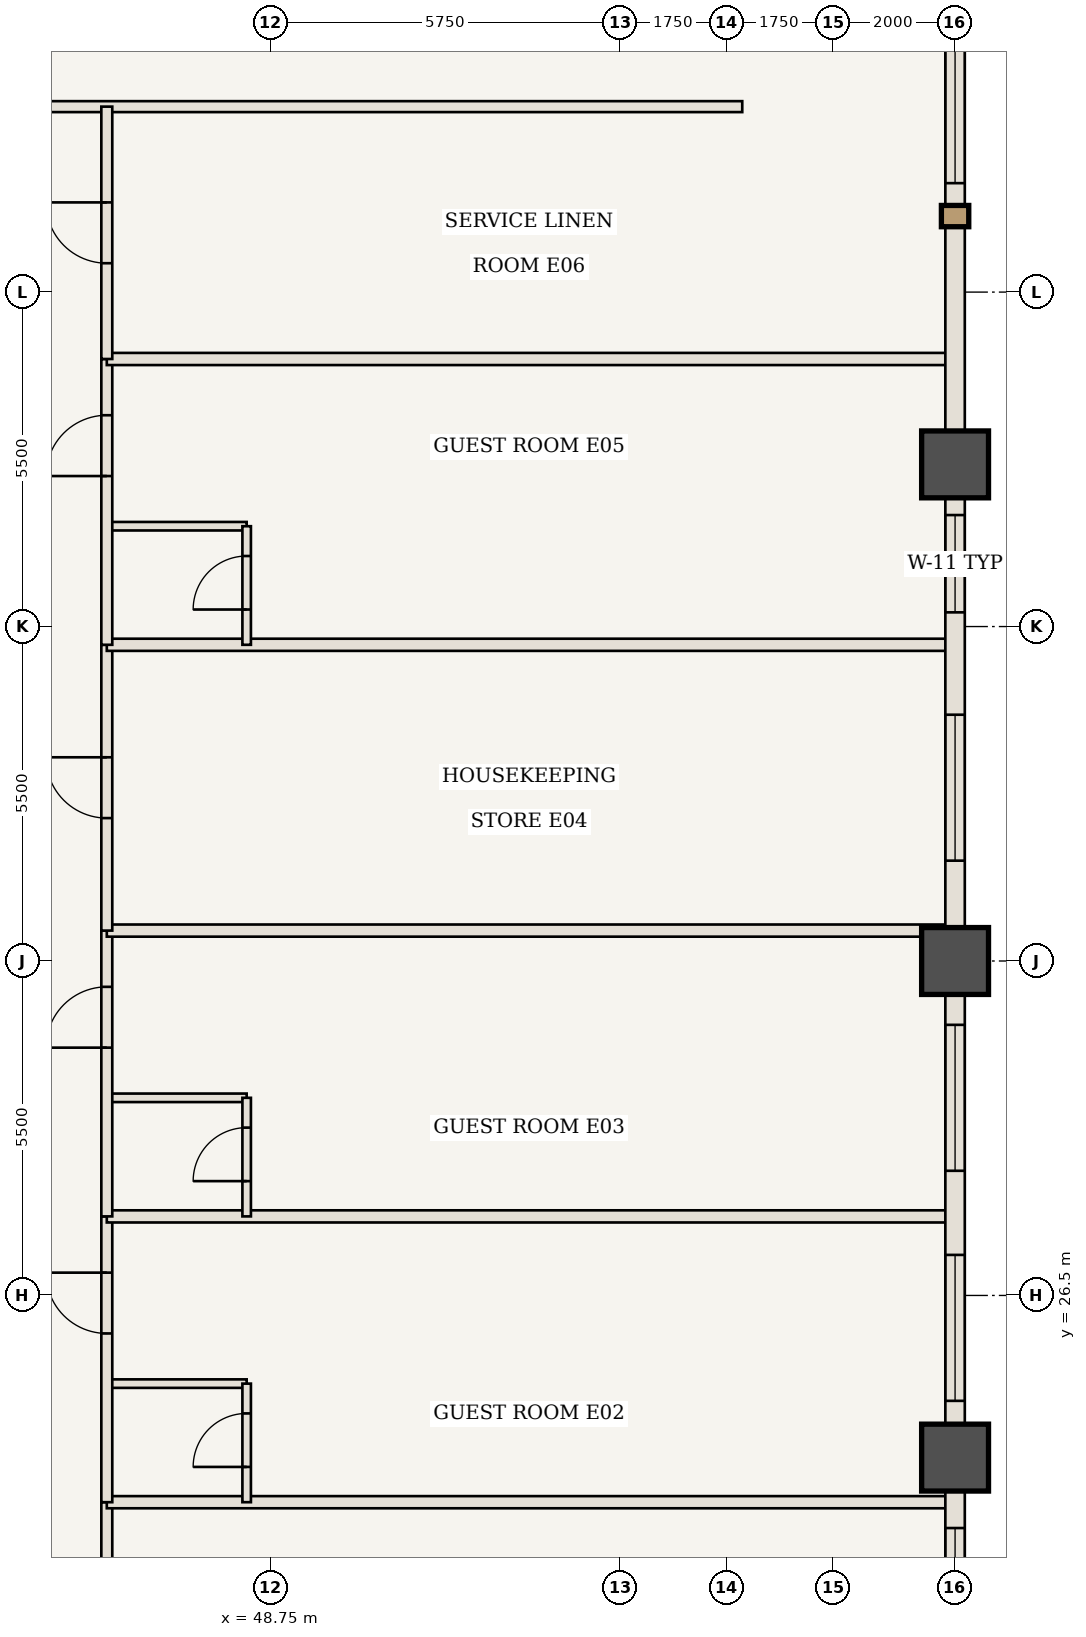
"""IFC4 building model, lengths in metres.
Left out: names, types, materials, properties, quantities, classifications, styles, units other than length and angle.
Written with IfcOpenShell. Run it as: python <this file> out.ifc"""

import sys

from ifc_helpers import new_model, si_unit, direction, frame, frame_2d, origin, origin_2d, place, context, subcontext, project, spatial, rectangle, extrude, element, fill, save


model = new_model("IFC4")
c1 = context("Model", 3, precision=1e-05, world=origin(), true_north=direction((0.0, 1.0)))
c2 = subcontext(c1, "Body", "Model", "MODEL_VIEW")
j1 = project(units=[si_unit("LENGTHUNIT", "METRE"), si_unit("PLANEANGLEUNIT", "RADIAN")], contexts=[c1])
p1 = place(None, origin())
s1 = spatial("IfcSite", under=j1, at=p1, CompositionType="ELEMENT")
p2 = place(p1, origin())
s2 = spatial("IfcBuilding", under=s1, at=p2, CompositionType="ELEMENT")
p3 = place(p2, frame((0.0, 0.0, 66.85)))
s3 = spatial("IfcBuildingStorey", under=s2, at=p3, CompositionType="ELEMENT", Elevation=66.85)
for number, where, z_axis, x_axis in (
    (1, (60.0, 23.833, 0.0), (0.0, 0.0, 1.0), (1.0, 0.0, 0.0)),
    (2, (60.0, 32.0, 0.0), (0.0, 0.0, 1.0), (1.0, 0.0, 0.0)),
    (3, (60.0, 40.167, 0.0), (0.0, 0.0, 1.0), (1.0, 0.0, 0.0)),
):
    element("IfcColumn", number, at=place(p3, frame(where, z_axis=z_axis, x_axis=x_axis)), inside=s3, PredefinedType="COLUMN", context=c2, shape_type="SweptSolid", body=[
        extrude(rectangle(XDim=1.1, YDim=1.1, at=origin_2d()), origin(), (0.0, 0.0, 1.0), 3.5),
    ])
p4 = place(p3, frame((33.8, 46.05, 0.0), z_axis=(0.0, 0.0, 1.0), x_axis=(1.0, 0.0, 0.0)))
e4 = element("IfcWall", 4, at=p4, inside=s3, PredefinedType="STANDARD", context=c2, shape_type="SweptSolid", body=[
    extrude(rectangle(XDim=22.7, YDim=0.18, at=frame_2d((11.35, 0.0))), origin(), (0.0, 0.0, 1.0), 3.32),
])
p5 = place(p4, frame((5.6, 0.0, 0.0)))
e5 = element("IfcOpeningElement", 5, at=p5, cuts=e4, PredefinedType="OPENING", context=c2, shape_type="SweptSolid", body=[
    extrude(rectangle(XDim=1.0, YDim=2.15, at=frame_2d((0.5, 1.075))), frame((0.0, 0.1, 0.0), z_axis=(0.0, -1.0, 0.0), x_axis=(1.0, 0.0, 0.0)), (0.0, 0.0, 1.0), 0.2),
])
p6 = place(p3, frame((46.05, 17.95, 0.0), z_axis=(0.0, 0.0, 1.0), x_axis=(0.0, 1.0, 0.0)))
e6 = element("IfcWall", 6, at=p6, inside=s3, PredefinedType="STANDARD", context=c2, shape_type="SweptSolid", body=[
    extrude(rectangle(XDim=5.15, YDim=0.18, at=frame_2d((2.575, 0.0))), origin(), (0.0, 0.0, 1.0), 3.32),
])
p7 = place(p6, frame((3.0, 0.0, 0.0)))
e7 = element("IfcOpeningElement", 7, at=p7, cuts=e6, PredefinedType="OPENING", context=c2, shape_type="SweptSolid", body=[
    extrude(rectangle(XDim=1.0, YDim=2.15, at=frame_2d((0.5, 1.075))), frame((0.0, 0.1, 0.0), z_axis=(0.0, -1.0, 0.0), x_axis=(1.0, 0.0, 0.0)), (0.0, 0.0, 1.0), 0.2),
])
p8 = place(p3, frame((46.05, 23.1, 0.0), z_axis=(0.0, 0.0, 1.0), x_axis=(1.0, 0.0, 0.0)))
e8 = element("IfcWall", 8, at=p8, inside=s3, PredefinedType="STANDARD", context=c2, shape_type="SweptSolid", body=[
    extrude(rectangle(XDim=13.89, YDim=0.2, at=frame_2d((6.945, 0.0))), origin(), (0.0, 0.0, 1.0), 3.32),
])
p9 = place(p3, frame((46.05, 25.05, 0.0), z_axis=(0.0, 0.0, 1.0), x_axis=(1.0, 0.0, 0.0)))
e9 = element("IfcWall", 9, at=p9, inside=s3, PredefinedType="STANDARD", context=c2, shape_type="SweptSolid", body=[
    extrude(rectangle(XDim=2.3, YDim=0.14, at=frame_2d((1.15, 0.0))), origin(), (0.0, 0.0, 1.0), 3.32),
])
p10 = place(p3, frame((48.35, 23.1, 0.0), z_axis=(0.0, 0.0, 1.0), x_axis=(0.0, 1.0, 0.0)))
e10 = element("IfcWall", 10, at=p10, inside=s3, PredefinedType="STANDARD", context=c2, shape_type="SweptSolid", body=[
    extrude(rectangle(XDim=1.95, YDim=0.14, at=frame_2d((0.975, 0.0))), origin(), (0.0, 0.0, 1.0), 3.32),
])
p11 = place(p10, frame((0.58, 0.0, 0.0)))
e11 = element("IfcOpeningElement", 11, at=p11, cuts=e10, PredefinedType="OPENING", context=c2, shape_type="SweptSolid", body=[
    extrude(rectangle(XDim=0.88, YDim=2.1, at=frame_2d((0.44, 1.05))), frame((0.0, 0.08, 0.0), z_axis=(0.0, -1.0, 0.0), x_axis=(1.0, 0.0, 0.0)), (0.0, 0.0, 1.0), 0.16),
])
p12 = place(p3, frame((46.05, 23.1, 0.0), z_axis=(0.0, 0.0, 1.0), x_axis=(0.0, 1.0, 0.0)))
e12 = element("IfcWall", 12, at=p12, inside=s3, PredefinedType="STANDARD", context=c2, shape_type="SweptSolid", body=[
    extrude(rectangle(XDim=4.7, YDim=0.18, at=frame_2d((2.35, 0.0))), origin(), (0.0, 0.0, 1.0), 3.32),
])
p13 = place(p12, frame((2.775, 0.0, 0.0)))
e13 = element("IfcOpeningElement", 13, at=p13, cuts=e12, PredefinedType="OPENING", context=c2, shape_type="SweptSolid", body=[
    extrude(rectangle(XDim=1.0, YDim=2.15, at=frame_2d((0.5, 1.075))), frame((0.0, 0.1, 0.0), z_axis=(0.0, -1.0, 0.0), x_axis=(1.0, 0.0, 0.0)), (0.0, 0.0, 1.0), 0.2),
])
p14 = place(p3, frame((46.05, 27.8, 0.0), z_axis=(0.0, 0.0, 1.0), x_axis=(1.0, 0.0, 0.0)))
e14 = element("IfcWall", 14, at=p14, inside=s3, PredefinedType="STANDARD", context=c2, shape_type="SweptSolid", body=[
    extrude(rectangle(XDim=13.89, YDim=0.2, at=frame_2d((6.945, 0.0))), origin(), (0.0, 0.0, 1.0), 3.32),
])
p15 = place(p3, frame((46.05, 29.75, 0.0), z_axis=(0.0, 0.0, 1.0), x_axis=(1.0, 0.0, 0.0)))
e15 = element("IfcWall", 15, at=p15, inside=s3, PredefinedType="STANDARD", context=c2, shape_type="SweptSolid", body=[
    extrude(rectangle(XDim=2.3, YDim=0.14, at=frame_2d((1.15, 0.0))), origin(), (0.0, 0.0, 1.0), 3.32),
])
p16 = place(p3, frame((48.35, 27.8, 0.0), z_axis=(0.0, 0.0, 1.0), x_axis=(0.0, 1.0, 0.0)))
e16 = element("IfcWall", 16, at=p16, inside=s3, PredefinedType="STANDARD", context=c2, shape_type="SweptSolid", body=[
    extrude(rectangle(XDim=1.95, YDim=0.14, at=frame_2d((0.975, 0.0))), origin(), (0.0, 0.0, 1.0), 3.32),
])
p17 = place(p16, frame((0.58, 0.0, 0.0)))
e17 = element("IfcOpeningElement", 17, at=p17, cuts=e16, PredefinedType="OPENING", context=c2, shape_type="SweptSolid", body=[
    extrude(rectangle(XDim=0.88, YDim=2.1, at=frame_2d((0.44, 1.05))), frame((0.0, 0.08, 0.0), z_axis=(0.0, -1.0, 0.0), x_axis=(1.0, 0.0, 0.0)), (0.0, 0.0, 1.0), 0.16),
])
p18 = place(p3, frame((46.05, 27.8, 0.0), z_axis=(0.0, 0.0, 1.0), x_axis=(0.0, 1.0, 0.0)))
e18 = element("IfcWall", 18, at=p18, inside=s3, PredefinedType="STANDARD", context=c2, shape_type="SweptSolid", body=[
    extrude(rectangle(XDim=4.7, YDim=0.18, at=frame_2d((2.35, 0.0))), origin(), (0.0, 0.0, 1.0), 3.32),
])
p19 = place(p18, frame((2.775, 0.0, 0.0)))
e19 = element("IfcOpeningElement", 19, at=p19, cuts=e18, PredefinedType="OPENING", context=c2, shape_type="SweptSolid", body=[
    extrude(rectangle(XDim=1.0, YDim=2.15, at=frame_2d((0.5, 1.075))), frame((0.0, 0.1, 0.0), z_axis=(0.0, -1.0, 0.0), x_axis=(1.0, 0.0, 0.0)), (0.0, 0.0, 1.0), 0.2),
])
p20 = place(p3, frame((46.05, 32.5, 0.0), z_axis=(0.0, 0.0, 1.0), x_axis=(1.0, 0.0, 0.0)))
e20 = element("IfcWall", 20, at=p20, inside=s3, PredefinedType="STANDARD", context=c2, shape_type="SweptSolid", body=[
    extrude(rectangle(XDim=13.89, YDim=0.2, at=frame_2d((6.945, 0.0))), origin(), (0.0, 0.0, 1.0), 3.32),
])
p21 = place(p3, frame((46.05, 32.5, 0.0), z_axis=(0.0, 0.0, 1.0), x_axis=(0.0, 1.0, 0.0)))
e21 = element("IfcWall", 21, at=p21, inside=s3, PredefinedType="STANDARD", context=c2, shape_type="SweptSolid", body=[
    extrude(rectangle(XDim=4.7, YDim=0.18, at=frame_2d((2.35, 0.0))), origin(), (0.0, 0.0, 1.0), 3.32),
])
p22 = place(p21, frame((1.85, 0.0, 0.0)))
e22 = element("IfcOpeningElement", 22, at=p22, cuts=e21, PredefinedType="OPENING", context=c2, shape_type="SweptSolid", body=[
    extrude(rectangle(XDim=1.0, YDim=2.15, at=frame_2d((0.5, 1.075))), frame((0.0, 0.1, 0.0), z_axis=(0.0, -1.0, 0.0), x_axis=(1.0, 0.0, 0.0)), (0.0, 0.0, 1.0), 0.2),
])
p23 = place(p3, frame((46.05, 37.2, 0.0), z_axis=(0.0, 0.0, 1.0), x_axis=(1.0, 0.0, 0.0)))
e23 = element("IfcWall", 23, at=p23, inside=s3, PredefinedType="STANDARD", context=c2, shape_type="SweptSolid", body=[
    extrude(rectangle(XDim=13.89, YDim=0.2, at=frame_2d((6.945, 0.0))), origin(), (0.0, 0.0, 1.0), 3.32),
])
p24 = place(p3, frame((46.05, 39.15, 0.0), z_axis=(0.0, 0.0, 1.0), x_axis=(1.0, 0.0, 0.0)))
e24 = element("IfcWall", 24, at=p24, inside=s3, PredefinedType="STANDARD", context=c2, shape_type="SweptSolid", body=[
    extrude(rectangle(XDim=2.3, YDim=0.14, at=frame_2d((1.15, 0.0))), origin(), (0.0, 0.0, 1.0), 3.32),
])
p25 = place(p3, frame((48.35, 37.2, 0.0), z_axis=(0.0, 0.0, 1.0), x_axis=(0.0, 1.0, 0.0)))
e25 = element("IfcWall", 25, at=p25, inside=s3, PredefinedType="STANDARD", context=c2, shape_type="SweptSolid", body=[
    extrude(rectangle(XDim=1.95, YDim=0.14, at=frame_2d((0.975, 0.0))), origin(), (0.0, 0.0, 1.0), 3.32),
])
p26 = place(p25, frame((0.58, 0.0, 0.0)))
e26 = element("IfcOpeningElement", 26, at=p26, cuts=e25, PredefinedType="OPENING", context=c2, shape_type="SweptSolid", body=[
    extrude(rectangle(XDim=0.88, YDim=2.1, at=frame_2d((0.44, 1.05))), frame((0.0, 0.08, 0.0), z_axis=(0.0, -1.0, 0.0), x_axis=(1.0, 0.0, 0.0)), (0.0, 0.0, 1.0), 0.16),
])
p27 = place(p3, frame((46.05, 37.2, 0.0), z_axis=(0.0, 0.0, 1.0), x_axis=(0.0, 1.0, 0.0)))
e27 = element("IfcWall", 27, at=p27, inside=s3, PredefinedType="STANDARD", context=c2, shape_type="SweptSolid", body=[
    extrude(rectangle(XDim=4.7, YDim=0.18, at=frame_2d((2.35, 0.0))), origin(), (0.0, 0.0, 1.0), 3.32),
])
p28 = place(p27, frame((2.775, 0.0, 0.0)))
e28 = element("IfcOpeningElement", 28, at=p28, cuts=e27, PredefinedType="OPENING", context=c2, shape_type="SweptSolid", body=[
    extrude(rectangle(XDim=1.0, YDim=2.15, at=frame_2d((0.5, 1.075))), frame((0.0, 0.1, 0.0), z_axis=(0.0, -1.0, 0.0), x_axis=(1.0, 0.0, 0.0)), (0.0, 0.0, 1.0), 0.2),
])
p29 = place(p3, frame((46.05, 41.9, 0.0), z_axis=(0.0, 0.0, 1.0), x_axis=(1.0, 0.0, 0.0)))
e29 = element("IfcWall", 29, at=p29, inside=s3, PredefinedType="STANDARD", context=c2, shape_type="SweptSolid", body=[
    extrude(rectangle(XDim=13.89, YDim=0.2, at=frame_2d((6.945, 0.0))), origin(), (0.0, 0.0, 1.0), 3.32),
])
p30 = place(p3, frame((46.05, 41.9, 0.0), z_axis=(0.0, 0.0, 1.0), x_axis=(0.0, 1.0, 0.0)))
e30 = element("IfcWall", 30, at=p30, inside=s3, PredefinedType="STANDARD", context=c2, shape_type="SweptSolid", body=[
    extrude(rectangle(XDim=4.15, YDim=0.18, at=frame_2d((2.075, 0.0))), origin(), (0.0, 0.0, 1.0), 3.32),
])
p31 = place(p30, frame((1.575, 0.0, 0.0)))
e31 = element("IfcOpeningElement", 31, at=p31, cuts=e30, PredefinedType="OPENING", context=c2, shape_type="SweptSolid", body=[
    extrude(rectangle(XDim=1.0, YDim=2.15, at=frame_2d((0.5, 1.075))), frame((0.0, 0.1, 0.0), z_axis=(0.0, -1.0, 0.0), x_axis=(1.0, 0.0, 0.0)), (0.0, 0.0, 1.0), 0.2),
])
p32 = place(p3, frame((60.0, 23.833, 0.0), z_axis=(0.0, 0.0, 1.0), x_axis=(0.0, -1.0, 0.0)))
e32 = element("IfcWall", 32, at=p32, inside=s3, PredefinedType="USERDEFINED", context=c2, shape_type="SweptSolid", body=[
    extrude(rectangle(XDim=8.167, YDim=0.32, at=frame_2d((4.083, 0.0))), origin(), (0.0, 0.0, 1.0), 2.52),
])
p33 = place(p32, frame((1.158, 0.0, 0.85)))
e33 = element("IfcOpeningElement", 33, at=p33, cuts=e32, PredefinedType="OPENING", context=c2, shape_type="SweptSolid", body=[
    extrude(rectangle(XDim=2.4, YDim=1.47, at=frame_2d((1.2, 0.735))), frame((0.0, 0.17, 0.0), z_axis=(0.0, -1.0, 0.0), x_axis=(1.0, 0.0, 0.0)), (0.0, 0.0, 1.0), 0.34),
])
p34 = place(p32, frame((4.625, 0.0, 0.85)))
e34 = element("IfcOpeningElement", 34, at=p34, cuts=e32, PredefinedType="OPENING", context=c2, shape_type="SweptSolid", body=[
    extrude(rectangle(XDim=2.8, YDim=1.47, at=frame_2d((1.4, 0.735))), frame((0.0, 0.17, 0.0), z_axis=(0.0, -1.0, 0.0), x_axis=(1.0, 0.0, 0.0)), (0.0, 0.0, 1.0), 0.34),
])
p35 = place(p3, frame((60.0, 32.0, 0.0), z_axis=(0.0, 0.0, 1.0), x_axis=(0.0, -1.0, 0.0)))
e35 = element("IfcWall", 35, at=p35, inside=s3, PredefinedType="USERDEFINED", context=c2, shape_type="SweptSolid", body=[
    extrude(rectangle(XDim=8.167, YDim=0.32, at=frame_2d((4.083, 0.0))), origin(), (0.0, 0.0, 1.0), 2.52),
])
p36 = place(p35, frame((1.05, 0.0, 0.85)))
e36 = element("IfcOpeningElement", 36, at=p36, cuts=e35, PredefinedType="OPENING", context=c2, shape_type="SweptSolid", body=[
    extrude(rectangle(XDim=2.4, YDim=1.47, at=frame_2d((1.2, 0.735))), frame((0.0, 0.17, 0.0), z_axis=(0.0, -1.0, 0.0), x_axis=(1.0, 0.0, 0.0)), (0.0, 0.0, 1.0), 0.34),
])
p37 = place(p35, frame((4.833, 0.0, 0.85)))
e37 = element("IfcOpeningElement", 37, at=p37, cuts=e35, PredefinedType="OPENING", context=c2, shape_type="SweptSolid", body=[
    extrude(rectangle(XDim=2.4, YDim=1.47, at=frame_2d((1.2, 0.735))), frame((0.0, 0.17, 0.0), z_axis=(0.0, -1.0, 0.0), x_axis=(1.0, 0.0, 0.0)), (0.0, 0.0, 1.0), 0.34),
])
p38 = place(p3, frame((60.0, 40.167, 0.0), z_axis=(0.0, 0.0, 1.0), x_axis=(0.0, -1.0, 0.0)))
e38 = element("IfcWall", 38, at=p38, inside=s3, PredefinedType="USERDEFINED", context=c2, shape_type="SweptSolid", body=[
    extrude(rectangle(XDim=8.167, YDim=0.32, at=frame_2d((4.083, 0.0))), origin(), (0.0, 0.0, 1.0), 2.52),
])
p39 = place(p38, frame((0.833, 0.0, 0.85)))
e39 = element("IfcOpeningElement", 39, at=p39, cuts=e38, PredefinedType="OPENING", context=c2, shape_type="SweptSolid", body=[
    extrude(rectangle(XDim=1.6, YDim=1.47, at=frame_2d((0.8, 0.735))), frame((0.0, 0.17, 0.0), z_axis=(0.0, -1.0, 0.0), x_axis=(1.0, 0.0, 0.0)), (0.0, 0.0, 1.0), 0.34),
])
p40 = place(p38, frame((4.117, 0.0, 0.85)))
e40 = element("IfcOpeningElement", 40, at=p40, cuts=e38, PredefinedType="OPENING", context=c2, shape_type="SweptSolid", body=[
    extrude(rectangle(XDim=2.4, YDim=1.47, at=frame_2d((1.2, 0.735))), frame((0.0, 0.17, 0.0), z_axis=(0.0, -1.0, 0.0), x_axis=(1.0, 0.0, 0.0)), (0.0, 0.0, 1.0), 0.34),
])
p41 = place(p3, frame((60.0, 48.333, 0.0), z_axis=(0.0, 0.0, 1.0), x_axis=(0.0, -1.0, 0.0)))
e41 = element("IfcWall", 41, at=p41, inside=s3, PredefinedType="USERDEFINED", context=c2, shape_type="SweptSolid", body=[
    extrude(rectangle(XDim=8.167, YDim=0.32, at=frame_2d((4.083, 0.0))), origin(), (0.0, 0.0, 1.0), 2.52),
])
p42 = place(p41, frame((0.742, 0.0, 0.85)))
e42 = element("IfcOpeningElement", 42, at=p42, cuts=e41, PredefinedType="OPENING", context=c2, shape_type="SweptSolid", body=[
    extrude(rectangle(XDim=2.8, YDim=1.47, at=frame_2d((1.4, 0.735))), frame((0.0, 0.17, 0.0), z_axis=(0.0, -1.0, 0.0), x_axis=(1.0, 0.0, 0.0)), (0.0, 0.0, 1.0), 0.34),
])
p43 = place(p11, origin())
e43 = element("IfcDoor", 43, at=p43, inside=s3, OperationType="SINGLE_SWING_LEFT", PredefinedType="DOOR", context=c2, shape_type="SweptSolid", body=[
    extrude(rectangle(XDim=0.88, YDim=2.1, at=frame_2d((0.44, 1.05))), frame((0.0, 0.025, 0.0), z_axis=(0.0, -1.0, 0.0), x_axis=(1.0, 0.0, 0.0)), (0.0, 0.0, 1.0), 0.05),
])
fill(e11, e43)
p44 = place(p13, origin())
e44 = element("IfcDoor", 44, at=p44, inside=s3, OperationType="SINGLE_SWING_RIGHT", PredefinedType="DOOR", context=c2, shape_type="SweptSolid", body=[
    extrude(rectangle(XDim=1.0, YDim=2.15, at=frame_2d((0.5, 1.075))), frame((0.0, 0.025, 0.0), z_axis=(0.0, -1.0, 0.0), x_axis=(1.0, 0.0, 0.0)), (0.0, 0.0, 1.0), 0.05),
])
fill(e13, e44)
p45 = place(p17, origin())
e45 = element("IfcDoor", 45, at=p45, inside=s3, OperationType="SINGLE_SWING_LEFT", PredefinedType="DOOR", context=c2, shape_type="SweptSolid", body=[
    extrude(rectangle(XDim=0.88, YDim=2.1, at=frame_2d((0.44, 1.05))), frame((0.0, 0.025, 0.0), z_axis=(0.0, -1.0, 0.0), x_axis=(1.0, 0.0, 0.0)), (0.0, 0.0, 1.0), 0.05),
])
fill(e17, e45)
p46 = place(p19, origin())
e46 = element("IfcDoor", 46, at=p46, inside=s3, OperationType="SINGLE_SWING_LEFT", PredefinedType="DOOR", context=c2, shape_type="SweptSolid", body=[
    extrude(rectangle(XDim=1.0, YDim=2.15, at=frame_2d((0.5, 1.075))), frame((0.0, 0.025, 0.0), z_axis=(0.0, -1.0, 0.0), x_axis=(1.0, 0.0, 0.0)), (0.0, 0.0, 1.0), 0.05),
])
fill(e19, e46)
p47 = place(p22, origin())
e47 = element("IfcDoor", 47, at=p47, inside=s3, OperationType="SINGLE_SWING_RIGHT", PredefinedType="DOOR", context=c2, shape_type="SweptSolid", body=[
    extrude(rectangle(XDim=1.0, YDim=2.15, at=frame_2d((0.5, 1.075))), frame((0.0, 0.025, 0.0), z_axis=(0.0, -1.0, 0.0), x_axis=(1.0, 0.0, 0.0)), (0.0, 0.0, 1.0), 0.05),
])
fill(e22, e47)
p48 = place(p26, origin())
e48 = element("IfcDoor", 48, at=p48, inside=s3, OperationType="SINGLE_SWING_LEFT", PredefinedType="DOOR", context=c2, shape_type="SweptSolid", body=[
    extrude(rectangle(XDim=0.88, YDim=2.1, at=frame_2d((0.44, 1.05))), frame((0.0, 0.025, 0.0), z_axis=(0.0, -1.0, 0.0), x_axis=(1.0, 0.0, 0.0)), (0.0, 0.0, 1.0), 0.05),
])
fill(e26, e48)
p49 = place(p28, origin())
e49 = element("IfcDoor", 49, at=p49, inside=s3, OperationType="SINGLE_SWING_LEFT", PredefinedType="DOOR", context=c2, shape_type="SweptSolid", body=[
    extrude(rectangle(XDim=1.0, YDim=2.15, at=frame_2d((0.5, 1.075))), frame((0.0, 0.025, 0.0), z_axis=(0.0, -1.0, 0.0), x_axis=(1.0, 0.0, 0.0)), (0.0, 0.0, 1.0), 0.05),
])
fill(e28, e49)
p50 = place(p31, origin())
e50 = element("IfcDoor", 50, at=p50, inside=s3, OperationType="SINGLE_SWING_RIGHT", PredefinedType="DOOR", context=c2, shape_type="SweptSolid", body=[
    extrude(rectangle(XDim=1.0, YDim=2.15, at=frame_2d((0.5, 1.075))), frame((0.0, 0.025, 0.0), z_axis=(0.0, -1.0, 0.0), x_axis=(1.0, 0.0, 0.0)), (0.0, 0.0, 1.0), 0.05),
])
fill(e31, e50)
p51 = place(p33, origin())
e51 = element("IfcWindow", 51, at=p51, inside=s3, PartitioningType="SINGLE_PANEL", PredefinedType="WINDOW", context=c2, shape_type="SweptSolid", body=[
    extrude(rectangle(XDim=2.4, YDim=1.47, at=frame_2d((1.2, 0.735))), frame((0.0, 0.03, 0.0), z_axis=(0.0, -1.0, 0.0), x_axis=(1.0, 0.0, 0.0)), (0.0, 0.0, 1.0), 0.06),
])
fill(e33, e51)
p52 = place(p36, origin())
e52 = element("IfcWindow", 52, at=p52, inside=s3, PartitioningType="SINGLE_PANEL", PredefinedType="WINDOW", context=c2, shape_type="SweptSolid", body=[
    extrude(rectangle(XDim=2.4, YDim=1.47, at=frame_2d((1.2, 0.735))), frame((0.0, 0.03, 0.0), z_axis=(0.0, -1.0, 0.0), x_axis=(1.0, 0.0, 0.0)), (0.0, 0.0, 1.0), 0.06),
])
fill(e36, e52)
p53 = place(p37, origin())
e53 = element("IfcWindow", 53, at=p53, inside=s3, PartitioningType="SINGLE_PANEL", PredefinedType="WINDOW", context=c2, shape_type="SweptSolid", body=[
    extrude(rectangle(XDim=2.4, YDim=1.47, at=frame_2d((1.2, 0.735))), frame((0.0, 0.03, 0.0), z_axis=(0.0, -1.0, 0.0), x_axis=(1.0, 0.0, 0.0)), (0.0, 0.0, 1.0), 0.06),
])
fill(e37, e53)
p54 = place(p39, origin())
e54 = element("IfcWindow", 54, at=p54, inside=s3, PartitioningType="SINGLE_PANEL", PredefinedType="WINDOW", context=c2, shape_type="SweptSolid", body=[
    extrude(rectangle(XDim=1.6, YDim=1.47, at=frame_2d((0.8, 0.735))), frame((0.0, 0.03, 0.0), z_axis=(0.0, -1.0, 0.0), x_axis=(1.0, 0.0, 0.0)), (0.0, 0.0, 1.0), 0.06),
])
fill(e39, e54)
p55 = place(p40, origin())
e55 = element("IfcWindow", 55, at=p55, inside=s3, PartitioningType="SINGLE_PANEL", PredefinedType="WINDOW", context=c2, shape_type="SweptSolid", body=[
    extrude(rectangle(XDim=2.4, YDim=1.47, at=frame_2d((1.2, 0.735))), frame((0.0, 0.03, 0.0), z_axis=(0.0, -1.0, 0.0), x_axis=(1.0, 0.0, 0.0)), (0.0, 0.0, 1.0), 0.06),
])
fill(e40, e55)
p56 = place(p42, origin())
e56 = element("IfcWindow", 56, at=p56, inside=s3, PartitioningType="SINGLE_PANEL", PredefinedType="WINDOW", context=c2, shape_type="SweptSolid", body=[
    extrude(rectangle(XDim=2.8, YDim=1.47, at=frame_2d((1.4, 0.735))), frame((0.0, 0.03, 0.0), z_axis=(0.0, -1.0, 0.0), x_axis=(1.0, 0.0, 0.0)), (0.0, 0.0, 1.0), 0.06),
])
fill(e42, e56)
save(model, sys.argv[1])
